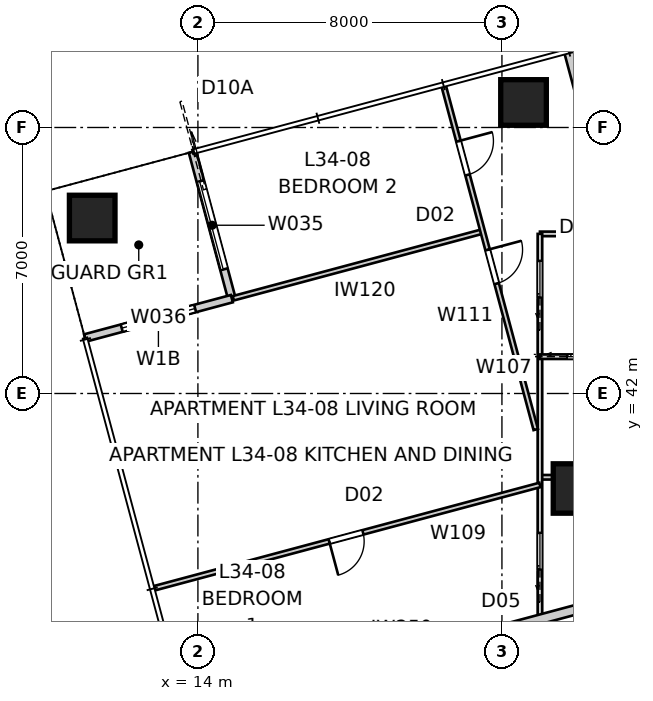
"""IFC4 building model, lengths in metres.
Left out: names, types, materials, properties, quantities, classifications, styles, units other than length and angle.
Written with IfcOpenShell. Run it as: python <this file> out.ifc"""

import sys

from ifc_helpers import new_model, si_unit, direction, frame, frame_2d, origin, origin_2d, place, context, subcontext, project, spatial, rectangle, extrude, element, fill, save


model = new_model("IFC4")
c1 = context("Model", 3, precision=1e-05, world=origin(), true_north=direction((0.0, 1.0)))
c2 = subcontext(c1, "Body", "Model", "MODEL_VIEW")
j1 = project(units=[si_unit("LENGTHUNIT", "METRE"), si_unit("PLANEANGLEUNIT", "RADIAN")], contexts=[c1])
p1 = place(None, origin())
s1 = spatial("IfcSite", under=j1, at=p1, CompositionType="ELEMENT")
p2 = place(p1, origin())
s2 = spatial("IfcBuilding", under=s1, at=p2, CompositionType="ELEMENT")
p3 = place(p2, frame((0.0, 0.0, 125.2)))
s3 = spatial("IfcBuildingStorey", under=s2, at=p3, CompositionType="ELEMENT", Elevation=125.2)
for number, where, z_axis, x_axis in (
    (1, (22.568, 49.658, 0.0), (0.0, 0.0, 1.0), (1.0, 0.0, 0.0)),
    (2, (11.219, 46.617, 0.0), (0.0, 0.0, 1.0), (1.0, 0.0, 0.0)),
):
    element("IfcColumn", number, at=place(p3, frame(where, z_axis=z_axis, x_axis=x_axis)), inside=s3, PredefinedType="COLUMN", context=c2, shape_type="SweptSolid", body=[
        extrude(rectangle(XDim=1.2, YDim=1.2, at=origin_2d()), origin(), (0.0, 0.0, 1.0), 3.4),
    ])
p4 = place(p3, frame((24.0, 39.5, 0.0), z_axis=(0.0, 0.0, 1.0), x_axis=(1.0, 0.0, 0.0)))
e3 = element("IfcColumn", 3, at=p4, inside=s3, PredefinedType="COLUMN", context=c2, shape_type="SweptSolid", body=[
    extrude(rectangle(XDim=1.3, YDim=1.3, at=origin_2d()), origin(), (0.0, 0.0, 1.0), 3.4),
])
p5 = place(p3, frame((13.857, 48.359, 0.0), z_axis=(0.0, 0.0, 1.0), x_axis=(0.258843877716, -0.965919172068, 0.0)))
e4 = element("IfcWall", 4, at=p5, inside=s3, PredefinedType="SOLIDWALL", context=c2, shape_type="SweptSolid", body=[
    extrude(rectangle(XDim=4.0, YDim=0.2, at=frame_2d((2.0, 0.0))), origin(), (0.0, 0.0, 1.0), 3.25),
])
p6 = place(p5, frame((0.8, 0.0, 0.0)))
e5 = element("IfcOpeningElement", 5, at=p6, cuts=e4, PredefinedType="OPENING", context=c2, shape_type="SweptSolid", body=[
    extrude(rectangle(XDim=2.4, YDim=2.1, at=frame_2d((1.2, 1.05))), frame((0.0, 0.11, 0.0), z_axis=(0.0, -1.0, 0.0), x_axis=(1.0, 0.0, 0.0)), (0.0, 0.0, 1.0), 0.22),
])
p7 = place(p3, frame((14.893, 44.496, 0.0), z_axis=(0.0, 0.0, 1.0), x_axis=(-0.965934430412, -0.258786931944, 0.0)))
e6 = element("IfcWall", 6, at=p7, inside=s3, PredefinedType="SOLIDWALL", context=c2, shape_type="SweptSolid", body=[
    extrude(rectangle(XDim=4.0, YDim=0.2, at=frame_2d((2.0, 0.0))), origin(), (0.0, 0.0, 1.0), 3.25),
])
p8 = place(p7, frame((1.0, 0.0, 0.45)))
e7 = element("IfcOpeningElement", 7, at=p8, cuts=e6, PredefinedType="OPENING", context=c2, shape_type="SweptSolid", body=[
    extrude(rectangle(XDim=2.0, YDim=1.8, at=frame_2d((1.0, 0.9))), frame((0.0, 0.11, 0.0), z_axis=(0.0, -1.0, 0.0), x_axis=(1.0, 0.0, 0.0)), (0.0, 0.0, 1.0), 0.22),
])
p9 = place(p3, frame((23.758, 51.012, 0.0), z_axis=(0.0, 0.0, 1.0), x_axis=(0.258805213744, -0.965929532284, 0.0)))
e8 = element("IfcWall", 8, at=p9, inside=s3, PredefinedType="PARTITIONING", context=c2, shape_type="SweptSolid", body=[
    extrude(rectangle(XDim=7.473, YDim=0.25, at=frame_2d((3.737, 0.0))), origin(), (0.0, 0.0, 1.0), 3.25),
])
p10 = place(p3, frame((13.682, 33.56, 0.0), z_axis=(0.0, 0.0, 1.0), x_axis=(0.965924438766, 0.258824223352, 0.0)))
e9 = element("IfcWall", 9, at=p10, inside=s3, PredefinedType="PARTITIONING", context=c2, shape_type="SweptSolid", body=[
    extrude(rectangle(XDim=12.138, YDim=0.25, at=frame_2d((6.069, 0.0))), origin(), (0.0, 0.0, 1.0), 3.25),
])
p11 = place(p3, frame((23.0, 46.2, 0.0), z_axis=(0.0, 0.0, 1.0), x_axis=(1.0, 0.0, 0.0)))
e10 = element("IfcWall", 10, at=p11, inside=s3, PredefinedType="PARTITIONING", context=c2, shape_type="SweptSolid", body=[
    extrude(rectangle(XDim=33.2, YDim=0.12, at=frame_2d((16.6, 0.0))), origin(), (0.0, 0.0, 1.0), 2.55),
])
p12 = place(p11, frame((5.844, 0.0, 0.0)))
e11 = element("IfcOpeningElement", 11, at=p12, cuts=e10, PredefinedType="OPENING", context=c2, shape_type="SweptSolid", body=[
    extrude(rectangle(XDim=0.92, YDim=2.34, at=frame_2d((0.46, 1.17))), frame((0.0, 0.07, 0.0), z_axis=(0.0, -1.0, 0.0), x_axis=(1.0, 0.0, 0.0)), (0.0, 0.0, 1.0), 0.14),
])
p13 = place(p11, frame((3.382, 0.0, 0.0)))
e12 = element("IfcOpeningElement", 12, at=p13, cuts=e10, PredefinedType="OPENING", context=c2, shape_type="SweptSolid", body=[
    extrude(rectangle(XDim=0.92, YDim=2.34, at=frame_2d((0.46, 1.17))), frame((0.0, 0.07, 0.0), z_axis=(0.0, -1.0, 0.0), x_axis=(1.0, 0.0, 0.0)), (0.0, 0.0, 1.0), 0.14),
])
p14 = place(p11, frame((9.452, 0.0, 0.0)))
e13 = element("IfcOpeningElement", 13, at=p14, cuts=e10, PredefinedType="OPENING", context=c2, shape_type="SweptSolid", body=[
    extrude(rectangle(XDim=0.92, YDim=2.34, at=frame_2d((0.46, 1.17))), frame((0.0, 0.07, 0.0), z_axis=(0.0, -1.0, 0.0), x_axis=(1.0, 0.0, 0.0)), (0.0, 0.0, 1.0), 0.14),
])
p15 = place(p11, frame((27.775, 0.0, 0.0)))
e14 = element("IfcOpeningElement", 14, at=p15, cuts=e10, PredefinedType="OPENING", context=c2, shape_type="SweptSolid", body=[
    extrude(rectangle(XDim=0.92, YDim=2.34, at=frame_2d((0.46, 1.17))), frame((0.0, 0.07, 0.0), z_axis=(0.0, -1.0, 0.0), x_axis=(1.0, 0.0, 0.0)), (0.0, 0.0, 1.0), 0.14),
])
p16 = place(p11, frame((15.05, 0.0, 0.0)))
e15 = element("IfcOpeningElement", 15, at=p16, cuts=e10, PredefinedType="OPENING", context=c2, shape_type="SweptSolid", body=[
    extrude(rectangle(XDim=0.96, YDim=2.1, at=frame_2d((0.48, 1.05))), frame((0.0, 0.07, 0.0), z_axis=(0.0, -1.0, 0.0), x_axis=(1.0, 0.0, 0.0)), (0.0, 0.0, 1.0), 0.14),
])
p17 = place(p3, frame((25.4, 39.795, 0.0), z_axis=(0.0, 0.0, 1.0), x_axis=(-1.0, 0.0, 0.0)))
e16 = element("IfcWall", 16, at=p17, inside=s3, PredefinedType="PARTITIONING", context=c2, shape_type="SweptSolid", body=[
    extrude(rectangle(XDim=2.4, YDim=0.12, at=frame_2d((1.2, 0.0))), origin(), (0.0, 0.0, 1.0), 3.25),
])
p18 = place(p3, frame((23.0, 28.93, 0.0), z_axis=(0.0, 0.0, 1.0), x_axis=(0.0, 1.0, 0.0)))
e17 = element("IfcWall", 17, at=p18, inside=s3, PredefinedType="PARTITIONING", context=c2, shape_type="SweptSolid", body=[
    extrude(rectangle(XDim=17.27, YDim=0.12, at=frame_2d((8.635, 0.0))), origin(), (0.0, 0.0, 1.0), 2.55),
])
p19 = place(p18, frame((5.772, 0.0, 0.0)))
e18 = element("IfcOpeningElement", 18, at=p19, cuts=e17, PredefinedType="OPENING", context=c2, shape_type="SweptSolid", body=[
    extrude(rectangle(XDim=0.92, YDim=2.34, at=frame_2d((0.46, 1.17))), frame((0.0, 0.07, 0.0), z_axis=(0.0, -1.0, 0.0), x_axis=(1.0, 0.0, 0.0)), (0.0, 0.0, 1.0), 0.14),
])
p20 = place(p18, frame((15.599, 0.0, 0.0)))
e19 = element("IfcOpeningElement", 19, at=p20, cuts=e17, PredefinedType="OPENING", context=c2, shape_type="SweptSolid", body=[
    extrude(rectangle(XDim=0.96, YDim=2.1, at=frame_2d((0.48, 1.05))), frame((0.0, 0.07, 0.0), z_axis=(0.0, -1.0, 0.0), x_axis=(1.0, 0.0, 0.0)), (0.0, 0.0, 1.0), 0.14),
])
p21 = place(p18, frame((8.441, 0.0, 0.0)))
e20 = element("IfcOpeningElement", 20, at=p21, cuts=e17, PredefinedType="OPENING", context=c2, shape_type="SweptSolid", body=[
    extrude(rectangle(XDim=0.96, YDim=2.1, at=frame_2d((0.48, 1.05))), frame((0.0, 0.07, 0.0), z_axis=(0.0, -1.0, 0.0), x_axis=(1.0, 0.0, 0.0)), (0.0, 0.0, 1.0), 0.14),
])
p22 = place(p3, frame((23.0, 42.968, 0.0), z_axis=(0.0, 0.0, 1.0), x_axis=(1.0, 0.0, 0.0)))
e21 = element("IfcWall", 21, at=p22, inside=s3, PredefinedType="PARTITIONING", context=c2, shape_type="SweptSolid", body=[
    extrude(rectangle(XDim=2.4, YDim=0.12, at=frame_2d((1.2, 0.0))), origin(), (0.0, 0.0, 1.0), 3.25),
])
p23 = place(p22, frame((0.72, 0.0, 0.0)))
e22 = element("IfcOpeningElement", 22, at=p23, cuts=e21, PredefinedType="OPENING", context=c2, shape_type="SweptSolid", body=[
    extrude(rectangle(XDim=0.96, YDim=2.1, at=frame_2d((0.48, 1.05))), frame((0.0, 0.07, 0.0), z_axis=(0.0, -1.0, 0.0), x_axis=(1.0, 0.0, 0.0)), (0.0, 0.0, 1.0), 0.14),
])
p24 = place(p3, frame((23.0, 39.594, 0.0), z_axis=(0.0, 0.0, 1.0), x_axis=(-0.9659257847, -0.258819200315, 0.0)))
e23 = element("IfcWall", 23, at=p24, inside=s3, PredefinedType="PARTITIONING", context=c2, shape_type="SweptSolid", body=[
    extrude(rectangle(XDim=10.522, YDim=0.12, at=frame_2d((5.261, 0.0))), origin(), (0.0, 0.0, 1.0), 2.722),
])
p25 = place(p24, frame((4.821, 0.0, 0.0)))
e24 = element("IfcOpeningElement", 24, at=p25, cuts=e23, PredefinedType="OPENING", context=c2, shape_type="SweptSolid", body=[
    extrude(rectangle(XDim=0.92, YDim=2.34, at=frame_2d((0.46, 1.17))), frame((0.0, 0.07, 0.0), z_axis=(0.0, -1.0, 0.0), x_axis=(1.0, 0.0, 0.0)), (0.0, 0.0, 1.0), 0.14),
])
p26 = place(p3, frame((14.931, 44.506, 0.0), z_axis=(0.0, 0.0, 1.0), x_axis=(0.965922865286, 0.258830095464, 0.0)))
e25 = element("IfcWall", 25, at=p26, inside=s3, PredefinedType="PARTITIONING", context=c2, shape_type="SweptSolid", body=[
    extrude(rectangle(XDim=6.793, YDim=0.12, at=frame_2d((3.396, 0.0))), origin(), (0.0, 0.0, 1.0), 3.25),
])
p27 = place(p3, frame((20.468, 50.089, 0.0), z_axis=(0.0, 0.0, 1.0), x_axis=(0.25881390457, -0.965927203676, 0.0)))
e26 = element("IfcWall", 26, at=p27, inside=s3, PredefinedType="PARTITIONING", context=c2, shape_type="SweptSolid", body=[
    extrude(rectangle(XDim=9.357, YDim=0.12, at=frame_2d((4.678, 0.0))), origin(), (0.0, 0.0, 1.0), 2.638),
])
p28 = place(p27, frame((4.461, 0.0, 0.0)))
e27 = element("IfcOpeningElement", 27, at=p28, cuts=e26, PredefinedType="OPENING", context=c2, shape_type="SweptSolid", body=[
    extrude(rectangle(XDim=0.92, YDim=2.34, at=frame_2d((0.46, 1.17))), frame((0.0, 0.07, 0.0), z_axis=(0.0, -1.0, 0.0), x_axis=(1.0, 0.0, 0.0)), (0.0, 0.0, 1.0), 0.14),
])
p29 = place(p27, frame((1.5, 0.0, 0.0)))
e28 = element("IfcOpeningElement", 28, at=p29, cuts=e26, PredefinedType="OPENING", context=c2, shape_type="SweptSolid", body=[
    extrude(rectangle(XDim=0.92, YDim=2.34, at=frame_2d((0.46, 1.17))), frame((0.0, 0.07, 0.0), z_axis=(0.0, -1.0, 0.0), x_axis=(1.0, 0.0, 0.0)), (0.0, 0.0, 1.0), 0.14),
])
p30 = place(p6, origin())
e29 = element("IfcDoor", 29, at=p30, inside=s3, OperationType="SLIDING_TO_LEFT", PredefinedType="DOOR", context=c2, shape_type="SweptSolid", body=[
    extrude(rectangle(XDim=2.4, YDim=2.1, at=frame_2d((1.2, 1.05))), frame((0.0, 0.025, 0.0), z_axis=(0.0, -1.0, 0.0), x_axis=(1.0, 0.0, 0.0)), (0.0, 0.0, 1.0), 0.05),
])
fill(e5, e29)
p31 = place(p8, origin())
e30 = element("IfcWindow", 30, at=p31, inside=s3, PartitioningType="SINGLE_PANEL", PredefinedType="WINDOW", context=c2, shape_type="SweptSolid", body=[
    extrude(rectangle(XDim=2.0, YDim=1.8, at=frame_2d((1.0, 0.9))), frame((0.0, 0.03, 0.0), z_axis=(0.0, -1.0, 0.0), x_axis=(1.0, 0.0, 0.0)), (0.0, 0.0, 1.0), 0.06),
])
fill(e7, e30)
p32 = place(p23, origin())
e31 = element("IfcDoor", 31, at=p32, inside=s3, OperationType="SLIDING_TO_LEFT", PredefinedType="DOOR", context=c2, shape_type="SweptSolid", body=[
    extrude(rectangle(XDim=0.96, YDim=2.1, at=frame_2d((0.48, 1.05))), frame((0.0, 0.025, 0.0), z_axis=(0.0, -1.0, 0.0), x_axis=(1.0, 0.0, 0.0)), (0.0, 0.0, 1.0), 0.05),
])
fill(e22, e31)
p33 = place(p20, origin())
e32 = element("IfcDoor", 32, at=p33, inside=s3, OperationType="SLIDING_TO_LEFT", PredefinedType="DOOR", context=c2, shape_type="SweptSolid", body=[
    extrude(rectangle(XDim=0.96, YDim=2.1, at=frame_2d((0.48, 1.05))), frame((0.0, 0.025, 0.0), z_axis=(0.0, -1.0, 0.0), x_axis=(1.0, 0.0, 0.0)), (0.0, 0.0, 1.0), 0.05),
])
fill(e19, e32)
p34 = place(p28, origin())
e33 = element("IfcDoor", 33, at=p34, inside=s3, OperationType="SINGLE_SWING_LEFT", PredefinedType="DOOR", context=c2, shape_type="SweptSolid", body=[
    extrude(rectangle(XDim=0.92, YDim=2.34, at=frame_2d((0.46, 1.17))), frame((0.0, 0.025, 0.0), z_axis=(0.0, -1.0, 0.0), x_axis=(1.0, 0.0, 0.0)), (0.0, 0.0, 1.0), 0.05),
])
fill(e27, e33)
p35 = place(p29, origin())
e34 = element("IfcDoor", 34, at=p35, inside=s3, OperationType="SINGLE_SWING_LEFT", PredefinedType="DOOR", context=c2, shape_type="SweptSolid", body=[
    extrude(rectangle(XDim=0.92, YDim=2.34, at=frame_2d((0.46, 1.17))), frame((0.0, 0.025, 0.0), z_axis=(0.0, -1.0, 0.0), x_axis=(1.0, 0.0, 0.0)), (0.0, 0.0, 1.0), 0.05),
])
fill(e28, e34)
p36 = place(p25, origin())
e35 = element("IfcDoor", 35, at=p36, inside=s3, OperationType="SINGLE_SWING_RIGHT", PredefinedType="DOOR", context=c2, shape_type="SweptSolid", body=[
    extrude(rectangle(XDim=0.92, YDim=2.34, at=frame_2d((0.46, 1.17))), frame((0.0, 0.025, 0.0), z_axis=(0.0, -1.0, 0.0), x_axis=(1.0, 0.0, 0.0)), (0.0, 0.0, 1.0), 0.05),
])
fill(e24, e35)
p37 = place(p21, origin())
e36 = element("IfcDoor", 36, at=p37, inside=s3, OperationType="SLIDING_TO_LEFT", PredefinedType="DOOR", context=c2, shape_type="SweptSolid", body=[
    extrude(rectangle(XDim=0.96, YDim=2.1, at=frame_2d((0.48, 1.05))), frame((0.0, 0.025, 0.0), z_axis=(0.0, -1.0, 0.0), x_axis=(1.0, 0.0, 0.0)), (0.0, 0.0, 1.0), 0.05),
])
fill(e20, e36)
save(model, sys.argv[1])
